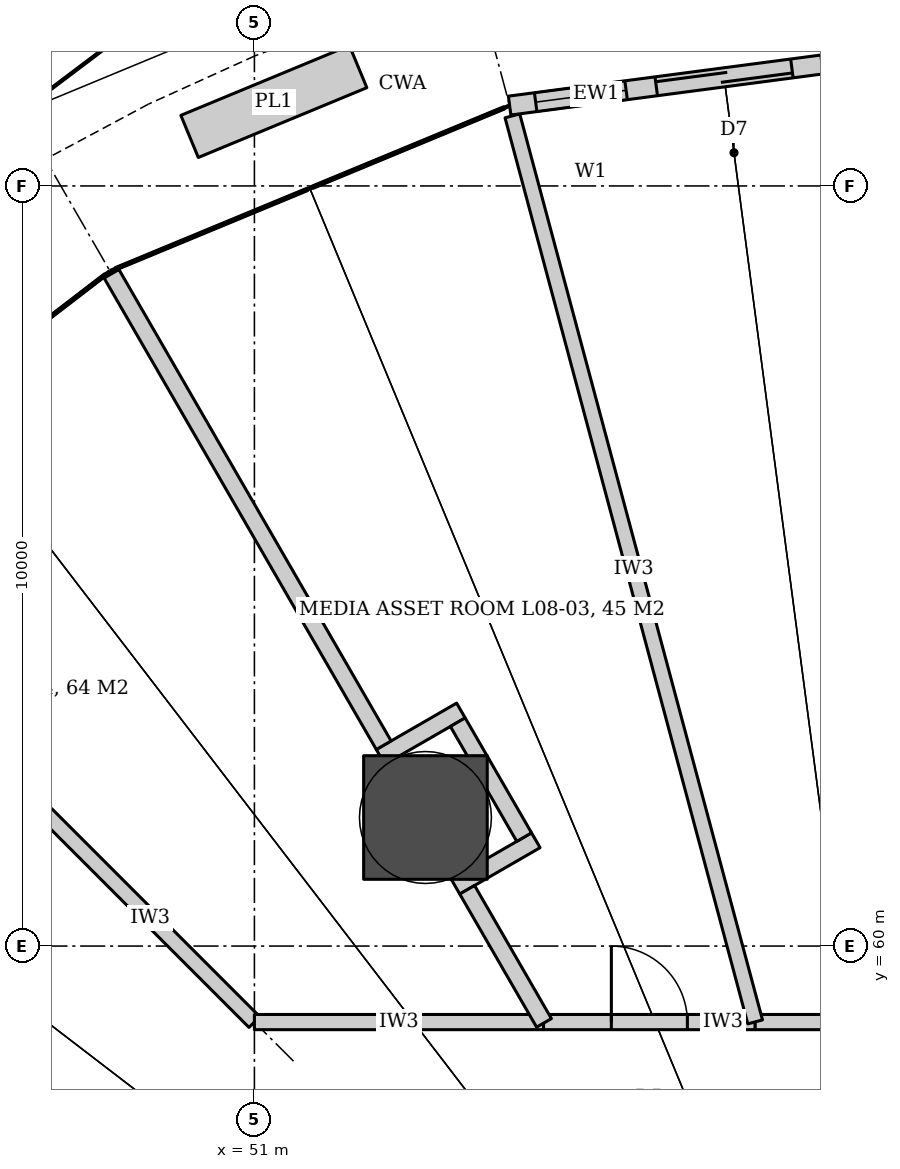
"""IFC4 building model, lengths in metres.
Left out: names, types, materials, properties, quantities, classifications, styles, units other than length and angle.
Written with IfcOpenShell. Run it as: python <this file> out.ifc"""

import sys

from ifc_helpers import new_model, si_unit, direction, frame, frame_2d, origin, origin_2d, place, context, subcontext, project, spatial, rectangle, hollow_circle, extrude, element, fill, save


model = new_model("IFC4")
c1 = context("Model", 3, precision=1e-05, world=origin(), true_north=direction((0.0, 1.0)))
c2 = subcontext(c1, "Body", "Model", "MODEL_VIEW")
j1 = project(units=[si_unit("LENGTHUNIT", "METRE"), si_unit("PLANEANGLEUNIT", "RADIAN")], contexts=[c1])
p1 = place(None, origin())
s1 = spatial("IfcSite", under=j1, at=p1, CompositionType="ELEMENT")
p2 = place(p1, origin())
s2 = spatial("IfcBuilding", under=s1, at=p2, CompositionType="ELEMENT")
p3 = place(p2, frame((0.0, 0.0, 42.8)))
s3 = spatial("IfcBuildingStorey", under=s2, at=p3, CompositionType="ELEMENT", Elevation=42.8)
p4 = place(p3, frame((53.25, 61.691, 0.0), z_axis=(0.0, 0.0, 1.0), x_axis=(1.0, 0.0, 0.0)))
e1 = element("IfcColumn", 1, at=p4, inside=s3, PredefinedType="COLUMN", context=c2, shape_type="SweptSolid", body=[
    extrude(hollow_circle(Radius=0.813, WallThickness=0.08, at=origin_2d()), origin(), (0.0, 0.0, 1.0), 4.2),
])
p5 = place(p3, frame((45.624, 58.3, 0.0), z_axis=(0.0, 0.0, 1.0), x_axis=(0.60874374674, 0.79336690806, 0.0)))
e2 = element("IfcWall", 2, at=p5, inside=s3, PredefinedType="PARTITIONING", context=c2, shape_type="SweptSolid", body=[
    extrude(rectangle(XDim=4.333, YDim=0.2, at=frame_2d((2.167, 0.0))), origin(), (0.0, 0.0, 1.0), 3.04),
])
p6 = place(p5, frame((1.567, 0.0, 0.0)))
e3 = element("IfcOpeningElement", 3, at=p6, cuts=e2, PredefinedType="OPENING", context=c2, shape_type="SweptSolid", body=[
    extrude(rectangle(XDim=1.2, YDim=2.4, at=frame_2d((0.6, 1.2))), frame((0.0, 0.11, 0.0), z_axis=(0.0, -1.0, 0.0), x_axis=(1.0, 0.0, 0.0)), (0.0, 0.0, 1.0), 0.22),
])
p7 = place(p3, frame((48.262, 61.738, 0.0), z_axis=(0.0, 0.0, 1.0), x_axis=(0.707106781187, -0.707106781187, 0.0)))
e4 = element("IfcWall", 4, at=p7, inside=s3, PredefinedType="PARTITIONING", context=c2, shape_type="SweptSolid", body=[
    extrude(rectangle(XDim=3.872, YDim=0.2, at=frame_2d((1.936, 0.0))), origin(), (0.0, 0.0, 1.0), 3.02),
])
p8 = place(p3, frame((51.0, 59.0, 0.0), z_axis=(0.0, 0.0, 1.0), x_axis=(1.0, 0.0, 0.0)))
e5 = element("IfcWall", 5, at=p8, inside=s3, PredefinedType="PARTITIONING", context=c2, shape_type="SweptSolid", body=[
    extrude(rectangle(XDim=3.804, YDim=0.2, at=frame_2d((1.902, 0.0))), origin(), (0.0, 0.0, 1.0), 3.02),
])
p9 = place(p3, frame((54.804, 59.0, 0.0), z_axis=(0.0, 0.0, 1.0), x_axis=(1.0, 0.0, 0.0)))
e6 = element("IfcWall", 6, at=p9, inside=s3, PredefinedType="PARTITIONING", context=c2, shape_type="SweptSolid", body=[
    extrude(rectangle(XDim=2.785, YDim=0.2, at=frame_2d((1.392, 0.0))), origin(), (0.0, 0.0, 1.0), 3.04),
])
p10 = place(p9, frame((0.892, 0.0, 0.0)))
e7 = element("IfcOpeningElement", 7, at=p10, cuts=e6, PredefinedType="OPENING", context=c2, shape_type="SweptSolid", body=[
    extrude(rectangle(XDim=1.0, YDim=2.1, at=frame_2d((0.5, 1.05))), frame((0.0, 0.11, 0.0), z_axis=(0.0, -1.0, 0.0), x_axis=(1.0, 0.0, 0.0)), (0.0, 0.0, 1.0), 0.22),
])
p11 = place(p3, frame((57.588, 59.0, 0.0), z_axis=(0.0, 0.0, 1.0), x_axis=(1.0, 0.0, 0.0)))
e8 = element("IfcWall", 8, at=p11, inside=s3, PredefinedType="PARTITIONING", context=c2, shape_type="SweptSolid", body=[
    extrude(rectangle(XDim=11.412, YDim=0.2, at=frame_2d((5.706, 0.0))), origin(), (0.0, 0.0, 1.0), 3.02),
])
p12 = place(p11, frame((4.706, 0.0, 0.0)))
e9 = element("IfcOpeningElement", 9, at=p12, cuts=e8, PredefinedType="OPENING", context=c2, shape_type="SweptSolid", body=[
    extrude(rectangle(XDim=2.0, YDim=2.1, at=frame_2d((1.0, 1.05))), frame((0.0, 0.11, 0.0), z_axis=(0.0, -1.0, 0.0), x_axis=(1.0, 0.0, 0.0)), (0.0, 0.0, 1.0), 0.22),
])
p13 = place(p3, frame((57.588, 59.002, 0.0), z_axis=(0.0, 0.0, 1.0), x_axis=(-0.258817505218, 0.965926238899, 0.0)))
e10 = element("IfcWall", 10, at=p13, inside=s3, PredefinedType="PARTITIONING", context=c2, shape_type="SweptSolid", body=[
    extrude(rectangle(XDim=12.34, YDim=0.2, at=frame_2d((6.17, 0.0))), origin(), (0.0, 0.0, 1.0), 3.02),
])
p14 = place(p3, frame((53.645, 60.781, 0.0), z_axis=(0.0, 0.0, 1.0), x_axis=(0.866019052629, 0.500011000363, 0.0)))
e11 = element("IfcWall", 11, at=p14, inside=s3, PredefinedType="PARTITIONING", context=c2, shape_type="SweptSolid", body=[
    extrude(rectangle(XDim=1.221, YDim=0.225, at=frame_2d((0.61, 0.0))), origin(), (0.0, 0.0, 1.0), 3.02),
])
p15 = place(p3, frame((52.66, 62.489, 0.0), z_axis=(0.0, 0.0, 1.0), x_axis=(0.865969036334, 0.500097618581, 0.0)))
e12 = element("IfcWall", 12, at=p15, inside=s3, PredefinedType="PARTITIONING", context=c2, shape_type="SweptSolid", body=[
    extrude(rectangle(XDim=1.22, YDim=0.225, at=frame_2d((0.61, 0.0))), origin(), (0.0, 0.0, 1.0), 3.02),
])
p16 = place(p3, frame((54.549, 61.433, 0.0), z_axis=(0.0, 0.0, 1.0), x_axis=(-0.500049268192, 0.865996956912, 0.0)))
e13 = element("IfcWall", 13, at=p16, inside=s3, PredefinedType="PARTITIONING", context=c2, shape_type="SweptSolid", body=[
    extrude(rectangle(XDim=1.746, YDim=0.225, at=frame_2d((0.873, 0.0))), origin(), (0.0, 0.0, 1.0), 3.02),
])
p17 = place(p3, frame((54.81, 58.989, 0.0), z_axis=(0.0, 0.0, 1.0), x_axis=(-0.499969802211, 0.866042837784, 0.0)))
e14 = element("IfcWall", 14, at=p17, inside=s3, PredefinedType="PARTITIONING", context=c2, shape_type="SweptSolid", body=[
    extrude(rectangle(XDim=2.022, YDim=0.225, at=frame_2d((1.011, 0.0))), origin(), (0.0, 0.0, 1.0), 3.04),
])
p18 = place(p3, frame((52.701, 62.642, 0.0), z_axis=(0.0, 0.0, 1.0), x_axis=(-0.499970319043, 0.866042539415, 0.0)))
e15 = element("IfcWall", 15, at=p18, inside=s3, PredefinedType="PARTITIONING", context=c2, shape_type="SweptSolid", body=[
    extrude(rectangle(XDim=7.162, YDim=0.225, at=frame_2d((3.581, 0.0))), origin(), (0.0, 0.0, 1.0), 3.04),
])
p19 = place(p3, frame((60.0, 71.8, 0.0), z_axis=(0.0, 0.0, 1.0), x_axis=(-0.991442756491, -0.130542179395, 0.0)))
e16 = element("IfcWall", 16, at=p19, inside=s3, PredefinedType="SOLIDWALL", context=c2, shape_type="SweptSolid", body=[
    extrude(rectangle(XDim=5.691, YDim=0.25, at=frame_2d((2.845, 0.0))), origin(), (0.0, 0.0, 1.0), 4.04),
])
p20 = place(p19, frame((1.946, 0.0, 0.0)))
e17 = element("IfcOpeningElement", 17, at=p20, cuts=e16, PredefinedType="OPENING", context=c2, shape_type="SweptSolid", body=[
    extrude(rectangle(XDim=1.8, YDim=2.4, at=frame_2d((0.9, 1.2))), frame((0.0, 0.135, 0.0), z_axis=(0.0, -1.0, 0.0), x_axis=(1.0, 0.0, 0.0)), (0.0, 0.0, 1.0), 0.27),
])
p21 = place(p19, frame((0.345, 0.0, 0.0)))
e18 = element("IfcOpeningElement", 18, at=p21, cuts=e16, PredefinedType="OPENING", context=c2, shape_type="SweptSolid", body=[
    extrude(rectangle(XDim=1.2, YDim=2.4, at=frame_2d((0.6, 1.2))), frame((0.0, 0.135, 0.0), z_axis=(0.0, -1.0, 0.0), x_axis=(1.0, 0.0, 0.0)), (0.0, 0.0, 1.0), 0.27),
])
p22 = place(p19, frame((4.146, 0.0, 0.0)))
e19 = element("IfcOpeningElement", 19, at=p22, cuts=e16, PredefinedType="OPENING", context=c2, shape_type="SweptSolid", body=[
    extrude(rectangle(XDim=1.2, YDim=2.4, at=frame_2d((0.6, 1.2))), frame((0.0, 0.135, 0.0), z_axis=(0.0, -1.0, 0.0), x_axis=(1.0, 0.0, 0.0)), (0.0, 0.0, 1.0), 0.27),
])
p23 = place(p10, origin())
e20 = element("IfcDoor", 20, at=p23, inside=s3, OperationType="SINGLE_SWING_LEFT", PredefinedType="DOOR", context=c2, shape_type="SweptSolid", body=[
    extrude(rectangle(XDim=1.0, YDim=2.1, at=frame_2d((0.5, 1.05))), frame((0.0, 0.025, 0.0), z_axis=(0.0, -1.0, 0.0), x_axis=(1.0, 0.0, 0.0)), (0.0, 0.0, 1.0), 0.05),
])
fill(e7, e20)
p24 = place(p20, origin())
e21 = element("IfcDoor", 21, at=p24, inside=s3, OperationType="DOUBLE_DOOR_SLIDING", PredefinedType="DOOR", context=c2, shape_type="SweptSolid", body=[
    extrude(rectangle(XDim=1.8, YDim=2.4, at=frame_2d((0.9, 1.2))), frame((0.0, 0.025, 0.0), z_axis=(0.0, -1.0, 0.0), x_axis=(1.0, 0.0, 0.0)), (0.0, 0.0, 1.0), 0.05),
])
fill(e17, e21)
p25 = place(p22, origin())
e22 = element("IfcWindow", 22, at=p25, inside=s3, PartitioningType="SINGLE_PANEL", PredefinedType="WINDOW", context=c2, shape_type="SweptSolid", body=[
    extrude(rectangle(XDim=1.2, YDim=2.4, at=frame_2d((0.6, 1.2))), frame((0.0, 0.03, 0.0), z_axis=(0.0, -1.0, 0.0), x_axis=(1.0, 0.0, 0.0)), (0.0, 0.0, 1.0), 0.06),
])
fill(e19, e22)
save(model, sys.argv[1])
